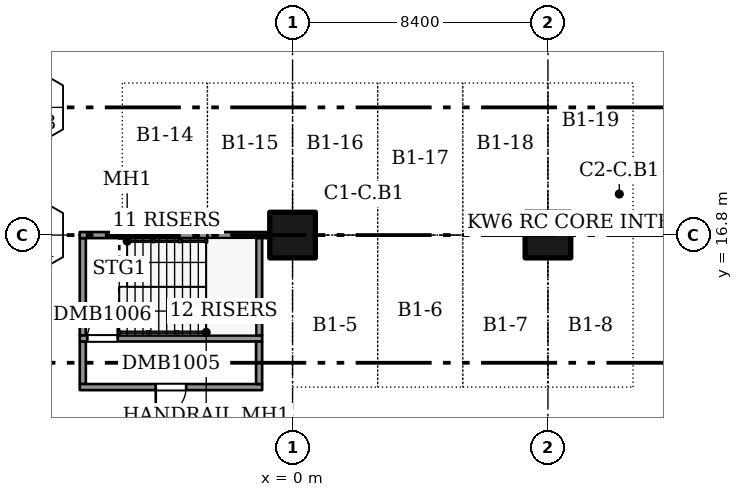
"""IFC4 building model, lengths in metres.
Left out: names, types, materials, properties, quantities, classifications, styles, units other than length and angle.
Written with IfcOpenShell. Run it as: python <this file> out.ifc"""

import sys

from ifc_helpers import new_model, si_unit, direction, frame, frame_2d, origin, origin_2d, place, context, subcontext, project, spatial, rectangle, extrude, element, fill, save


model = new_model("IFC4")
c1 = context("Model", 3, precision=1e-05, world=origin(), true_north=direction((0.0, 1.0)))
c2 = subcontext(c1, "Body", "Model", "MODEL_VIEW")
j1 = project(units=[si_unit("LENGTHUNIT", "METRE"), si_unit("PLANEANGLEUNIT", "RADIAN")], contexts=[c1])
p1 = place(None, origin())
s1 = spatial("IfcSite", under=j1, at=p1, CompositionType="ELEMENT")
p2 = place(p1, origin())
s2 = spatial("IfcBuilding", under=s1, at=p2, CompositionType="ELEMENT")
p3 = place(p2, frame((0.0, 0.0, -4.0)))
s3 = spatial("IfcBuildingStorey", under=s2, at=p3, CompositionType="ELEMENT", Elevation=-4.0)
for number, where, z_axis, x_axis in (
    (1, (0.0, 16.8, 0.0), (0.0, 0.0, 1.0), (1.0, 0.0, 0.0)),
    (2, (8.4, 16.8, 0.0), (0.0, 0.0, 1.0), (1.0, 0.0, 0.0)),
):
    element("IfcColumn", number, at=place(p3, frame(where, z_axis=z_axis, x_axis=x_axis)), inside=s3, PredefinedType="COLUMN", context=c2, shape_type="SweptSolid", body=[
        extrude(rectangle(XDim=1.5, YDim=1.5, at=origin_2d()), origin(), (0.0, 0.0, 1.0), 3.6),
    ])
p4 = place(p3, frame((-6.9, 11.9, 0.0), z_axis=(0.0, 0.0, 1.0), x_axis=(0.0, 1.0, 0.0)))
e3 = element("IfcWall", 3, at=p4, inside=s3, PredefinedType="SOLIDWALL", context=c2, shape_type="SweptSolid", body=[
    extrude(rectangle(XDim=1.4, YDim=0.2, at=frame_2d((0.7, 0.0))), origin(), (0.0, 0.0, 1.0), 4.0),
])
p5 = place(p3, frame((-7.0, 11.8, 0.0), z_axis=(0.0, 0.0, 1.0), x_axis=(1.0, 0.0, 0.0)))
e4 = element("IfcWall", 4, at=p5, inside=s3, PredefinedType="SOLIDWALL", context=c2, shape_type="SweptSolid", body=[
    extrude(rectangle(XDim=6.0, YDim=0.2, at=frame_2d((3.0, 0.0))), origin(), (0.0, 0.0, 1.0), 4.0),
])
p6 = place(p5, frame((2.5, 0.0, 0.0)))
e5 = element("IfcOpeningElement", 5, at=p6, cuts=e4, PredefinedType="OPENING", context=c2, shape_type="SweptSolid", body=[
    extrude(rectangle(XDim=1.0, YDim=2.1, at=frame_2d((0.5, 1.05))), frame((0.0, 0.11, 0.0), z_axis=(0.0, -1.0, 0.0), x_axis=(1.0, 0.0, 0.0)), (0.0, 0.0, 1.0), 0.22),
])
p7 = place(p3, frame((-6.9, 13.5, 0.0), z_axis=(0.0, 0.0, 1.0), x_axis=(0.0, 1.0, 0.0)))
e6 = element("IfcWall", 6, at=p7, inside=s3, PredefinedType="SOLIDWALL", context=c2, shape_type="SweptSolid", body=[
    extrude(rectangle(XDim=3.2, YDim=0.2, at=frame_2d((1.6, 0.0))), origin(), (0.0, 0.0, 1.0), 4.0),
])
p8 = place(p3, frame((-7.0, 13.4, 0.0), z_axis=(0.0, 0.0, 1.0), x_axis=(1.0, 0.0, 0.0)))
e7 = element("IfcWall", 7, at=p8, inside=s3, PredefinedType="SOLIDWALL", context=c2, shape_type="SweptSolid", body=[
    extrude(rectangle(XDim=6.0, YDim=0.2, at=frame_2d((3.0, 0.0))), origin(), (0.0, 0.0, 1.0), 4.0),
])
p9 = place(p8, frame((0.25, 0.0, 0.0)))
e8 = element("IfcOpeningElement", 8, at=p9, cuts=e7, PredefinedType="OPENING", context=c2, shape_type="SweptSolid", body=[
    extrude(rectangle(XDim=1.0, YDim=2.1, at=frame_2d((0.5, 1.05))), frame((0.0, 0.11, 0.0), z_axis=(0.0, -1.0, 0.0), x_axis=(1.0, 0.0, 0.0)), (0.0, 0.0, 1.0), 0.22),
])
p10 = place(p3, frame((-7.0, 16.8, 0.0), z_axis=(0.0, 0.0, 1.0), x_axis=(1.0, 0.0, 0.0)))
e9 = element("IfcWall", 9, at=p10, inside=s3, PredefinedType="SOLIDWALL", context=c2, shape_type="SweptSolid", body=[
    extrude(rectangle(XDim=1.4, YDim=0.2, at=frame_2d((0.7, 0.0))), origin(), (0.0, 0.0, 1.0), 4.0),
])
p11 = place(p3, frame((-5.6, 16.8, 0.0), z_axis=(0.0, 0.0, 1.0), x_axis=(1.0, 0.0, 0.0)))
e10 = element("IfcWall", 10, at=p11, inside=s3, PredefinedType="SOLIDWALL", context=c2, shape_type="SweptSolid", body=[
    extrude(rectangle(XDim=2.8, YDim=0.2, at=frame_2d((1.4, 0.0))), origin(), (0.0, 0.0, 1.0), 4.0),
])
p12 = place(p3, frame((-2.8, 16.8, 0.0), z_axis=(0.0, 0.0, 1.0), x_axis=(1.0, 0.0, 0.0)))
e11 = element("IfcWall", 11, at=p12, inside=s3, PredefinedType="SOLIDWALL", context=c2, shape_type="SweptSolid", body=[
    extrude(rectangle(XDim=2.05, YDim=0.2, at=frame_2d((1.025, 0.0))), origin(), (0.0, 0.0, 1.0), 4.0),
])
p13 = place(p3, frame((-1.1, 11.9, 0.0), z_axis=(0.0, 0.0, 1.0), x_axis=(0.0, 1.0, 0.0)))
e12 = element("IfcWall", 12, at=p13, inside=s3, PredefinedType="SOLIDWALL", context=c2, shape_type="SweptSolid", body=[
    extrude(rectangle(XDim=1.4, YDim=0.2, at=frame_2d((0.7, 0.0))), origin(), (0.0, 0.0, 1.0), 4.0),
])
p14 = place(p3, frame((-1.1, 13.5, 0.0), z_axis=(0.0, 0.0, 1.0), x_axis=(0.0, 1.0, 0.0)))
e13 = element("IfcWall", 13, at=p14, inside=s3, PredefinedType="SOLIDWALL", context=c2, shape_type="SweptSolid", body=[
    extrude(rectangle(XDim=3.2, YDim=0.2, at=frame_2d((1.6, 0.0))), origin(), (0.0, 0.0, 1.0), 4.0),
])
p15 = place(p6, frame((1.0, 0.0, 0.0), z_axis=(0.0, 0.0, 1.0), x_axis=(-1.0, 0.0, 0.0)))
e14 = element("IfcDoor", 14, at=p15, inside=s3, OperationType="SINGLE_SWING_RIGHT", PredefinedType="DOOR", context=c2, shape_type="SweptSolid", body=[
    extrude(rectangle(XDim=1.0, YDim=2.1, at=frame_2d((0.5, 1.05))), frame((0.0, 0.025, 0.0), z_axis=(0.0, -1.0, 0.0), x_axis=(1.0, 0.0, 0.0)), (0.0, 0.0, 1.0), 0.05),
])
fill(e5, e14)
p16 = place(p9, origin())
e15 = element("IfcDoor", 15, at=p16, inside=s3, OperationType="SINGLE_SWING_RIGHT", PredefinedType="DOOR", context=c2, shape_type="SweptSolid", body=[
    extrude(rectangle(XDim=1.0, YDim=2.1, at=frame_2d((0.5, 1.05))), frame((0.0, 0.025, 0.0), z_axis=(0.0, -1.0, 0.0), x_axis=(1.0, 0.0, 0.0)), (0.0, 0.0, 1.0), 0.05),
])
fill(e8, e15)
save(model, sys.argv[1])
